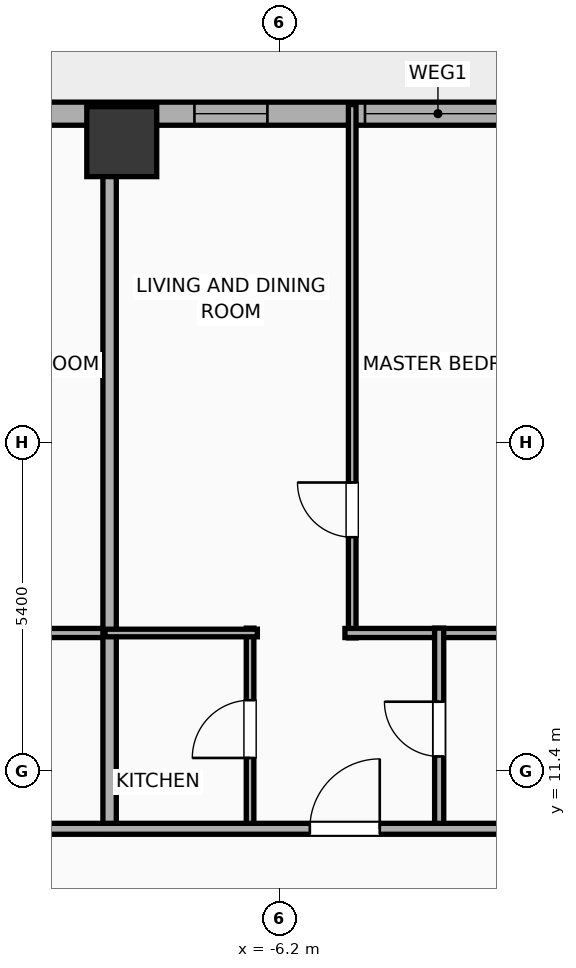
"""IFC4 building model, lengths in metres.
Left out: names, types, materials, properties, quantities, classifications, styles, units other than length and angle.
Written with IfcOpenShell. Run it as: python <this file> out.ifc"""

import sys

from ifc_helpers import new_model, si_unit, direction, frame, frame_2d, origin, origin_2d, place, context, subcontext, project, spatial, rectangle, hollow_rectangle, extrude, element, fill, save


model = new_model("IFC4")
c1 = context("Model", 3, precision=1e-05, world=origin(), true_north=direction((0.0, 1.0)))
c2 = subcontext(c1, "Body", "Model", "MODEL_VIEW")
j1 = project(units=[si_unit("LENGTHUNIT", "METRE"), si_unit("PLANEANGLEUNIT", "RADIAN")], contexts=[c1])
p1 = place(None, origin())
s1 = spatial("IfcSite", under=j1, at=p1, CompositionType="ELEMENT")
p2 = place(p1, origin())
s2 = spatial("IfcBuilding", under=s1, at=p2, CompositionType="ELEMENT")
p3 = place(p2, frame((0.0, 0.0, 26.0)))
s3 = spatial("IfcBuildingStorey", under=s2, at=p3, CompositionType="ELEMENT", Elevation=26.0)
p4 = place(p3, frame((-8.8, 21.75, -0.25), z_axis=(0.0, 0.0, 1.0), x_axis=(1.0, 0.0, 0.0)))
e1 = element("IfcColumn", 1, at=p4, inside=s3, PredefinedType="COLUMN", context=c2, shape_type="SweptSolid", body=[
    extrude(hollow_rectangle(XDim=1.15, YDim=1.15, WallThickness=0.04, at=origin_2d()), origin(), (0.0, 0.0, 1.0), 4.15),
])
p5 = place(p3, frame((-29.581, 22.21, 0.0), z_axis=(0.0, 0.0, 1.0), x_axis=(1.0, 0.0, 0.0)))
e2 = element("IfcWall", 2, at=p5, inside=s3, PredefinedType="ELEMENTEDWALL", context=c2, shape_type="SweptSolid", body=[
    extrude(rectangle(XDim=51.963, YDim=0.38, at=frame_2d((25.981, 0.0))), origin(), (0.0, 0.0, 1.0), 2.54),
])
p6 = place(p5, frame((6.61, 0.0, 0.75)))
e3 = element("IfcOpeningElement", 3, at=p6, cuts=e2, PredefinedType="OPENING", context=c2, shape_type="SweptSolid", body=[
    extrude(rectangle(XDim=2.4, YDim=1.63, at=frame_2d((1.2, 0.815))), frame((0.0, 0.2, 0.0), z_axis=(0.0, -1.0, 0.0), x_axis=(1.0, 0.0, 0.0)), (0.0, 0.0, 1.0), 0.4),
])
p7 = place(p5, frame((24.781, 0.0, 0.75)))
e4 = element("IfcOpeningElement", 4, at=p7, cuts=e2, PredefinedType="OPENING", context=c2, shape_type="SweptSolid", body=[
    extrude(rectangle(XDim=2.4, YDim=1.63, at=frame_2d((1.2, 0.815))), frame((0.0, 0.2, 0.0), z_axis=(0.0, -1.0, 0.0), x_axis=(1.0, 0.0, 0.0)), (0.0, 0.0, 1.0), 0.4),
])
p8 = place(p5, frame((42.952, 0.0, 0.75)))
e5 = element("IfcOpeningElement", 5, at=p8, cuts=e2, PredefinedType="OPENING", context=c2, shape_type="SweptSolid", body=[
    extrude(rectangle(XDim=2.4, YDim=1.63, at=frame_2d((1.2, 0.815))), frame((0.0, 0.2, 0.0), z_axis=(0.0, -1.0, 0.0), x_axis=(1.0, 0.0, 0.0)), (0.0, 0.0, 1.0), 0.4),
])
p9 = place(p5, frame((3.476, 0.0, 0.75)))
e6 = element("IfcOpeningElement", 6, at=p9, cuts=e2, PredefinedType="OPENING", context=c2, shape_type="SweptSolid", body=[
    extrude(rectangle(XDim=1.2, YDim=1.63, at=frame_2d((0.6, 0.815))), frame((0.0, 0.2, 0.0), z_axis=(0.0, -1.0, 0.0), x_axis=(1.0, 0.0, 0.0)), (0.0, 0.0, 1.0), 0.4),
])
p10 = place(p5, frame((11.236, 0.0, 0.75)))
e7 = element("IfcOpeningElement", 7, at=p10, cuts=e2, PredefinedType="OPENING", context=c2, shape_type="SweptSolid", body=[
    extrude(rectangle(XDim=1.2, YDim=1.63, at=frame_2d((0.6, 0.815))), frame((0.0, 0.2, 0.0), z_axis=(0.0, -1.0, 0.0), x_axis=(1.0, 0.0, 0.0)), (0.0, 0.0, 1.0), 0.4),
])
p11 = place(p5, frame((14.576, 0.0, 0.75)))
e8 = element("IfcOpeningElement", 8, at=p11, cuts=e2, PredefinedType="OPENING", context=c2, shape_type="SweptSolid", body=[
    extrude(rectangle(XDim=1.2, YDim=1.63, at=frame_2d((0.6, 0.815))), frame((0.0, 0.2, 0.0), z_axis=(0.0, -1.0, 0.0), x_axis=(1.0, 0.0, 0.0)), (0.0, 0.0, 1.0), 0.4),
])
p12 = place(p5, frame((18.276, 0.0, 0.75)))
e9 = element("IfcOpeningElement", 9, at=p12, cuts=e2, PredefinedType="OPENING", context=c2, shape_type="SweptSolid", body=[
    extrude(rectangle(XDim=1.2, YDim=1.63, at=frame_2d((0.6, 0.815))), frame((0.0, 0.2, 0.0), z_axis=(0.0, -1.0, 0.0), x_axis=(1.0, 0.0, 0.0)), (0.0, 0.0, 1.0), 0.4),
])
p13 = place(p5, frame((21.976, 0.0, 0.75)))
e10 = element("IfcOpeningElement", 10, at=p13, cuts=e2, PredefinedType="OPENING", context=c2, shape_type="SweptSolid", body=[
    extrude(rectangle(XDim=1.2, YDim=1.63, at=frame_2d((0.6, 0.815))), frame((0.0, 0.2, 0.0), z_axis=(0.0, -1.0, 0.0), x_axis=(1.0, 0.0, 0.0)), (0.0, 0.0, 1.0), 0.4),
])
p14 = place(p5, frame((29.136, 0.0, 0.75)))
e11 = element("IfcOpeningElement", 11, at=p14, cuts=e2, PredefinedType="OPENING", context=c2, shape_type="SweptSolid", body=[
    extrude(rectangle(XDim=1.2, YDim=1.63, at=frame_2d((0.6, 0.815))), frame((0.0, 0.2, 0.0), z_axis=(0.0, -1.0, 0.0), x_axis=(1.0, 0.0, 0.0)), (0.0, 0.0, 1.0), 0.4),
])
p15 = place(p5, frame((33.076, 0.0, 0.75)))
e12 = element("IfcOpeningElement", 12, at=p15, cuts=e2, PredefinedType="OPENING", context=c2, shape_type="SweptSolid", body=[
    extrude(rectangle(XDim=1.2, YDim=1.63, at=frame_2d((0.6, 0.815))), frame((0.0, 0.2, 0.0), z_axis=(0.0, -1.0, 0.0), x_axis=(1.0, 0.0, 0.0)), (0.0, 0.0, 1.0), 0.4),
])
p16 = place(p5, frame((36.776, 0.0, 0.75)))
e13 = element("IfcOpeningElement", 13, at=p16, cuts=e2, PredefinedType="OPENING", context=c2, shape_type="SweptSolid", body=[
    extrude(rectangle(XDim=1.2, YDim=1.63, at=frame_2d((0.6, 0.815))), frame((0.0, 0.2, 0.0), z_axis=(0.0, -1.0, 0.0), x_axis=(1.0, 0.0, 0.0)), (0.0, 0.0, 1.0), 0.4),
])
p17 = place(p5, frame((39.931, 0.0, 0.75)))
e14 = element("IfcOpeningElement", 14, at=p17, cuts=e2, PredefinedType="OPENING", context=c2, shape_type="SweptSolid", body=[
    extrude(rectangle(XDim=0.85, YDim=1.63, at=frame_2d((0.425, 0.815))), frame((0.0, 0.2, 0.0), z_axis=(0.0, -1.0, 0.0), x_axis=(1.0, 0.0, 0.0)), (0.0, 0.0, 1.0), 0.4),
])
p18 = place(p5, frame((47.469, 0.0, 0.75)))
e15 = element("IfcOpeningElement", 15, at=p18, cuts=e2, PredefinedType="OPENING", context=c2, shape_type="SweptSolid", body=[
    extrude(rectangle(XDim=1.2, YDim=1.63, at=frame_2d((0.6, 0.815))), frame((0.0, 0.2, 0.0), z_axis=(0.0, -1.0, 0.0), x_axis=(1.0, 0.0, 0.0)), (0.0, 0.0, 1.0), 0.4),
])
p19 = place(p5, frame((49.581, 0.0, 0.75)))
e16 = element("IfcOpeningElement", 16, at=p19, cuts=e2, PredefinedType="OPENING", context=c2, shape_type="SweptSolid", body=[
    extrude(rectangle(XDim=1.2, YDim=1.63, at=frame_2d((0.6, 0.815))), frame((0.0, 0.2, 0.0), z_axis=(0.0, -1.0, 0.0), x_axis=(1.0, 0.0, 0.0)), (0.0, 0.0, 1.0), 0.4),
])
p20 = place(p3, frame((-12.53, 13.67, 0.0), z_axis=(0.0, 0.0, 1.0), x_axis=(1.0, 0.0, 0.0)))
e17 = element("IfcWall", 17, at=p20, inside=s3, PredefinedType="PLUMBINGWALL", context=c2, shape_type="SweptSolid", body=[
    extrude(rectangle(XDim=3.605, YDim=0.15, at=frame_2d((1.802, 0.0))), origin(), (0.0, 0.0, 1.0), 3.65),
])
p21 = place(p3, frame((-9.0, 10.37, 0.0), z_axis=(0.0, 0.0, 1.0), x_axis=(0.0, 1.0, 0.0)))
e18 = element("IfcWall", 18, at=p21, inside=s3, PredefinedType="PARTITIONING", context=c2, shape_type="SweptSolid", body=[
    extrude(rectangle(XDim=11.84, YDim=0.22, at=frame_2d((5.92, 0.0))), origin(), (0.0, 0.0, 1.0), 2.54),
])
p22 = place(p3, frame((-5.01, 13.59, 0.0), z_axis=(0.0, 0.0, 1.0), x_axis=(0.0, 1.0, 0.0)))
e19 = element("IfcWall", 19, at=p22, inside=s3, PredefinedType="PARTITIONING", context=c2, shape_type="SweptSolid", body=[
    extrude(rectangle(XDim=8.77, YDim=0.125, at=frame_2d((4.385, 0.0))), origin(), (0.0, 0.0, 1.0), 3.65),
])
p23 = place(p22, frame((1.655, 0.0, 0.0)))
e20 = element("IfcOpeningElement", 20, at=p23, cuts=e19, PredefinedType="OPENING", context=c2, shape_type="SweptSolid", body=[
    extrude(rectangle(XDim=0.9, YDim=2.05, at=frame_2d((0.45, 1.025))), frame((0.0, 0.073, 0.0), z_axis=(0.0, -1.0, 0.0), x_axis=(1.0, 0.0, 0.0)), (0.0, 0.0, 1.0), 0.145),
])
p24 = place(p3, frame((-5.13, 13.67, 0.0), z_axis=(0.0, 0.0, 1.0), x_axis=(1.0, 0.0, 0.0)))
e21 = element("IfcWall", 21, at=p24, inside=s3, PredefinedType="PLUMBINGWALL", context=c2, shape_type="SweptSolid", body=[
    extrude(rectangle(XDim=3.605, YDim=0.15, at=frame_2d((1.802, 0.0))), origin(), (0.0, 0.0, 1.0), 3.65),
])
p25 = place(p3, frame((-6.69, 10.43, 0.0), z_axis=(0.0, 0.0, 1.0), x_axis=(0.0, 1.0, 0.0)))
e22 = element("IfcWall", 22, at=p25, inside=s3, PredefinedType="PARTITIONING", context=c2, shape_type="SweptSolid", body=[
    extrude(rectangle(XDim=3.32, YDim=0.125, at=frame_2d((1.66, 0.0))), origin(), (0.0, 0.0, 1.0), 3.65),
])
p26 = place(p25, frame((1.185, 0.0, 0.0)))
e23 = element("IfcOpeningElement", 23, at=p26, cuts=e22, PredefinedType="OPENING", context=c2, shape_type="SweptSolid", body=[
    extrude(rectangle(XDim=0.95, YDim=2.05, at=frame_2d((0.475, 1.025))), frame((0.0, 0.073, 0.0), z_axis=(0.0, -1.0, 0.0), x_axis=(1.0, 0.0, 0.0)), (0.0, 0.0, 1.0), 0.145),
])
p27 = place(p3, frame((-9.075, 13.67, 0.0), z_axis=(0.0, 0.0, 1.0), x_axis=(1.0, 0.0, 0.0)))
e24 = element("IfcWall", 24, at=p27, inside=s3, PredefinedType="PARTITIONING", context=c2, shape_type="SweptSolid", body=[
    extrude(rectangle(XDim=2.505, YDim=0.125, at=frame_2d((1.252, 0.0))), origin(), (0.0, 0.0, 1.0), 3.65),
])
p28 = place(p3, frame((-3.58, 10.43, 0.0), z_axis=(0.0, 0.0, 1.0), x_axis=(0.0, 1.0, 0.0)))
e25 = element("IfcWall", 25, at=p28, inside=s3, PredefinedType="PLUMBINGWALL", context=c2, shape_type="SweptSolid", body=[
    extrude(rectangle(XDim=3.32, YDim=0.15, at=frame_2d((1.66, 0.0))), origin(), (0.0, 0.0, 1.0), 3.65),
])
p29 = place(p28, frame((1.21, 0.0, 0.0)))
e26 = element("IfcOpeningElement", 26, at=p29, cuts=e25, PredefinedType="OPENING", context=c2, shape_type="SweptSolid", body=[
    extrude(rectangle(XDim=0.9, YDim=2.05, at=frame_2d((0.45, 1.025))), frame((0.0, 0.085, 0.0), z_axis=(0.0, -1.0, 0.0), x_axis=(1.0, 0.0, 0.0)), (0.0, 0.0, 1.0), 0.17),
])
p30 = place(p3, frame((-33.41, 10.45, 0.0), z_axis=(0.0, 0.0, 1.0), x_axis=(1.0, 0.0, 0.0)))
e27 = element("IfcWall", 27, at=p30, inside=s3, PredefinedType="PARTITIONING", context=c2, shape_type="SweptSolid", body=[
    extrude(rectangle(XDim=59.62, YDim=0.18, at=frame_2d((29.81, 0.0))), origin(), (0.0, 0.0, 1.0), 3.65),
])
p31 = place(p30, frame((4.529, 0.0, 0.0)))
e28 = element("IfcOpeningElement", 28, at=p31, cuts=e27, PredefinedType="OPENING", context=c2, shape_type="SweptSolid", body=[
    extrude(rectangle(XDim=1.15, YDim=2.05, at=frame_2d((0.575, 1.025))), frame((0.0, 0.1, 0.0), z_axis=(0.0, -1.0, 0.0), x_axis=(1.0, 0.0, 0.0)), (0.0, 0.0, 1.0), 0.2),
])
p32 = place(p30, frame((12.899, 0.0, 0.0)))
e29 = element("IfcOpeningElement", 29, at=p32, cuts=e27, PredefinedType="OPENING", context=c2, shape_type="SweptSolid", body=[
    extrude(rectangle(XDim=1.15, YDim=2.05, at=frame_2d((0.575, 1.025))), frame((0.0, 0.1, 0.0), z_axis=(0.0, -1.0, 0.0), x_axis=(1.0, 0.0, 0.0)), (0.0, 0.0, 1.0), 0.2),
])
p33 = place(p30, frame((20.298, 0.0, 0.0)))
e30 = element("IfcOpeningElement", 30, at=p33, cuts=e27, PredefinedType="OPENING", context=c2, shape_type="SweptSolid", body=[
    extrude(rectangle(XDim=1.15, YDim=2.05, at=frame_2d((0.575, 1.025))), frame((0.0, 0.1, 0.0), z_axis=(0.0, -1.0, 0.0), x_axis=(1.0, 0.0, 0.0)), (0.0, 0.0, 1.0), 0.2),
])
p34 = place(p30, frame((27.703, 0.0, 0.0)))
e31 = element("IfcOpeningElement", 31, at=p34, cuts=e27, PredefinedType="OPENING", context=c2, shape_type="SweptSolid", body=[
    extrude(rectangle(XDim=1.15, YDim=2.05, at=frame_2d((0.575, 1.025))), frame((0.0, 0.1, 0.0), z_axis=(0.0, -1.0, 0.0), x_axis=(1.0, 0.0, 0.0)), (0.0, 0.0, 1.0), 0.2),
])
p35 = place(p30, frame((35.102, 0.0, 0.0)))
e32 = element("IfcOpeningElement", 32, at=p35, cuts=e27, PredefinedType="OPENING", context=c2, shape_type="SweptSolid", body=[
    extrude(rectangle(XDim=1.15, YDim=2.05, at=frame_2d((0.575, 1.025))), frame((0.0, 0.1, 0.0), z_axis=(0.0, -1.0, 0.0), x_axis=(1.0, 0.0, 0.0)), (0.0, 0.0, 1.0), 0.2),
])
p36 = place(p30, frame((42.5, 0.0, 0.0)))
e33 = element("IfcOpeningElement", 33, at=p36, cuts=e27, PredefinedType="OPENING", context=c2, shape_type="SweptSolid", body=[
    extrude(rectangle(XDim=1.15, YDim=2.05, at=frame_2d((0.575, 1.025))), frame((0.0, 0.1, 0.0), z_axis=(0.0, -1.0, 0.0), x_axis=(1.0, 0.0, 0.0)), (0.0, 0.0, 1.0), 0.2),
])
p37 = place(p30, frame((48.099, 0.0, 0.0)))
e34 = element("IfcOpeningElement", 34, at=p37, cuts=e27, PredefinedType="OPENING", context=c2, shape_type="SweptSolid", body=[
    extrude(rectangle(XDim=1.15, YDim=2.05, at=frame_2d((0.575, 1.025))), frame((0.0, 0.1, 0.0), z_axis=(0.0, -1.0, 0.0), x_axis=(1.0, 0.0, 0.0)), (0.0, 0.0, 1.0), 0.2),
])
p38 = place(p30, frame((56.117, 0.0, 0.0)))
e35 = element("IfcOpeningElement", 35, at=p38, cuts=e27, PredefinedType="OPENING", context=c2, shape_type="SweptSolid", body=[
    extrude(rectangle(XDim=0.9, YDim=2.05, at=frame_2d((0.45, 1.025))), frame((0.0, 0.1, 0.0), z_axis=(0.0, -1.0, 0.0), x_axis=(1.0, 0.0, 0.0)), (0.0, 0.0, 1.0), 0.2),
])
p39 = place(p7, origin())
e36 = element("IfcWindow", 36, at=p39, inside=s3, PartitioningType="SINGLE_PANEL", PredefinedType="WINDOW", context=c2, shape_type="SweptSolid", body=[
    extrude(rectangle(XDim=2.4, YDim=1.63, at=frame_2d((1.2, 0.815))), frame((0.0, 0.03, 0.0), z_axis=(0.0, -1.0, 0.0), x_axis=(1.0, 0.0, 0.0)), (0.0, 0.0, 1.0), 0.06),
])
fill(e4, e36)
p40 = place(p13, origin())
e37 = element("IfcWindow", 37, at=p40, inside=s3, PartitioningType="SINGLE_PANEL", PredefinedType="WINDOW", context=c2, shape_type="SweptSolid", body=[
    extrude(rectangle(XDim=1.2, YDim=1.63, at=frame_2d((0.6, 0.815))), frame((0.0, 0.03, 0.0), z_axis=(0.0, -1.0, 0.0), x_axis=(1.0, 0.0, 0.0)), (0.0, 0.0, 1.0), 0.06),
])
fill(e10, e37)
p41 = place(p23, origin())
e38 = element("IfcDoor", 38, at=p41, inside=s3, OperationType="SINGLE_SWING_RIGHT", PredefinedType="DOOR", context=c2, shape_type="SweptSolid", body=[
    extrude(rectangle(XDim=0.9, YDim=2.05, at=frame_2d((0.45, 1.025))), frame((0.0, 0.025, 0.0), z_axis=(0.0, -1.0, 0.0), x_axis=(1.0, 0.0, 0.0)), (0.0, 0.0, 1.0), 0.05),
])
fill(e20, e38)
p42 = place(p26, origin())
e39 = element("IfcDoor", 39, at=p42, inside=s3, OperationType="SINGLE_SWING_LEFT", PredefinedType="DOOR", context=c2, shape_type="SweptSolid", body=[
    extrude(rectangle(XDim=0.95, YDim=2.05, at=frame_2d((0.475, 1.025))), frame((0.0, 0.025, 0.0), z_axis=(0.0, -1.0, 0.0), x_axis=(1.0, 0.0, 0.0)), (0.0, 0.0, 1.0), 0.05),
])
fill(e23, e39)
p43 = place(p29, origin())
e40 = element("IfcDoor", 40, at=p43, inside=s3, OperationType="SINGLE_SWING_RIGHT", PredefinedType="DOOR", context=c2, shape_type="SweptSolid", body=[
    extrude(rectangle(XDim=0.9, YDim=2.05, at=frame_2d((0.45, 1.025))), frame((0.0, 0.025, 0.0), z_axis=(0.0, -1.0, 0.0), x_axis=(1.0, 0.0, 0.0)), (0.0, 0.0, 1.0), 0.05),
])
fill(e26, e40)
p44 = place(p34, origin())
e41 = element("IfcDoor", 41, at=p44, inside=s3, OperationType="SINGLE_SWING_RIGHT", PredefinedType="DOOR", context=c2, shape_type="SweptSolid", body=[
    extrude(rectangle(XDim=1.15, YDim=2.05, at=frame_2d((0.575, 1.025))), frame((0.0, 0.025, 0.0), z_axis=(0.0, -1.0, 0.0), x_axis=(1.0, 0.0, 0.0)), (0.0, 0.0, 1.0), 0.05),
])
fill(e31, e41)
save(model, sys.argv[1])
